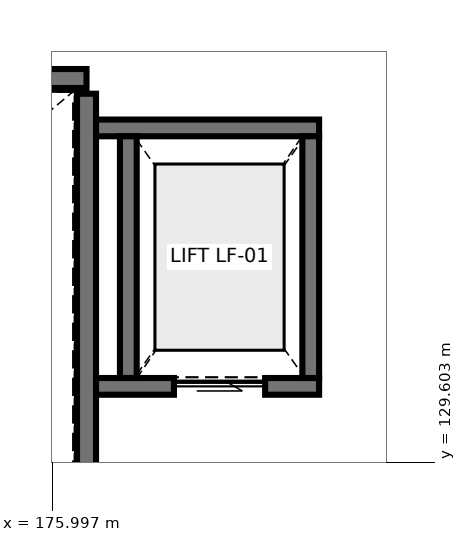
"""IFC4 building model, lengths in metres.
Left out: names, types, materials, properties, quantities, classifications, styles, units other than length and angle.
Written with IfcOpenShell. Run it as: python <this file> out.ifc"""

import sys

from ifc_helpers import new_model, si_unit, direction, frame, frame_2d, origin, place, context, subcontext, project, spatial, rectangle, extrude, element, fill, save


model = new_model("IFC4")
c1 = context("Model", 3, precision=1e-05, world=origin(), true_north=direction((0.0, 1.0)))
c2 = subcontext(c1, "Body", "Model", "MODEL_VIEW")
j1 = project(units=[si_unit("LENGTHUNIT", "METRE"), si_unit("PLANEANGLEUNIT", "RADIAN")], contexts=[c1])
p1 = place(None, origin())
s1 = spatial("IfcSite", under=j1, at=p1, CompositionType="ELEMENT")
p2 = place(p1, origin())
s2 = spatial("IfcBuilding", under=s1, at=p2, CompositionType="ELEMENT")
p3 = place(p2, frame((0.0, 0.0, 10.2)))
s3 = spatial("IfcBuildingStorey", under=s2, at=p3, CompositionType="ELEMENT", Elevation=10.2)
p4 = place(p3, frame((168.15, 134.65, 0.0), z_axis=(0.0, 0.0, 1.0), x_axis=(1.0, 0.0, 0.0)))
e1 = element("IfcWall", 1, at=p4, inside=s3, PredefinedType="SHEAR", context=c2, shape_type="SweptSolid", body=[
    extrude(rectangle(XDim=8.3, YDim=0.25, at=frame_2d((4.15, 0.0))), origin(), (0.0, 0.0, 1.0), 4.54),
])
p5 = place(p3, frame((176.45, 134.45, 0.0), z_axis=(0.0, 0.0, 1.0), x_axis=(0.0, -1.0, 0.0)))
e2 = element("IfcWall", 2, at=p5, inside=s3, PredefinedType="SHEAR", context=c2, shape_type="SweptSolid", body=[
    extrude(rectangle(XDim=5.3, YDim=0.25, at=frame_2d((2.65, 0.0))), origin(), (0.0, 0.0, 1.0), 4.54),
])
p6 = place(p3, frame((176.575, 130.6, 0.0), z_axis=(0.0, 0.0, 1.0), x_axis=(1.0, 0.0, 0.0)))
e3 = element("IfcWall", 3, at=p6, inside=s3, PredefinedType="SHEAR", context=c2, shape_type="SweptSolid", body=[
    extrude(rectangle(XDim=2.935, YDim=0.22, at=frame_2d((1.468, 0.0))), origin(), (0.0, 0.0, 1.0), 4.54),
])
p7 = place(p6, frame((1.025, 0.0, 0.0)))
e4 = element("IfcOpeningElement", 4, at=p7, cuts=e3, PredefinedType="OPENING", context=c2, shape_type="SweptSolid", body=[
    extrude(rectangle(XDim=1.2, YDim=2.25, at=frame_2d((0.6, 1.125))), frame((0.0, 0.12, 0.0), z_axis=(0.0, -1.0, 0.0), x_axis=(1.0, 0.0, 0.0)), (0.0, 0.0, 1.0), 0.24),
])
p8 = place(p3, frame((176.575, 134.0, 0.0), z_axis=(0.0, 0.0, 1.0), x_axis=(1.0, 0.0, 0.0)))
e5 = element("IfcWall", 5, at=p8, inside=s3, PredefinedType="SHEAR", context=c2, shape_type="SweptSolid", body=[
    extrude(rectangle(XDim=2.935, YDim=0.22, at=frame_2d((1.468, 0.0))), origin(), (0.0, 0.0, 1.0), 4.54),
])
for number, where, z_axis, x_axis in (
    (6, (177.0, 130.71, 0.0), (0.0, 0.0, 1.0), (0.0, 1.0, 0.0)),
    (7, (179.4, 130.71, 0.0), (0.0, 0.0, 1.0), (0.0, 1.0, 0.0)),
):
    element("IfcWall", number, at=place(p3, frame(where, z_axis=z_axis, x_axis=x_axis)), inside=s3, PredefinedType="SHEAR", context=c2, shape_type="SweptSolid", body=[
        extrude(rectangle(XDim=3.18, YDim=0.22, at=frame_2d((1.59, 0.0))), origin(), (0.0, 0.0, 1.0), 4.54),
    ])
p9 = place(p7, origin())
e8 = element("IfcDoor", 8, at=p9, inside=s3, OperationType="SLIDING_TO_LEFT", PredefinedType="DOOR", context=c2, shape_type="SweptSolid", body=[
    extrude(rectangle(XDim=1.2, YDim=2.25, at=frame_2d((0.6, 1.125))), frame((0.0, 0.025, 0.0), z_axis=(0.0, -1.0, 0.0), x_axis=(1.0, 0.0, 0.0)), (0.0, 0.0, 1.0), 0.05),
])
fill(e4, e8)
save(model, sys.argv[1])
